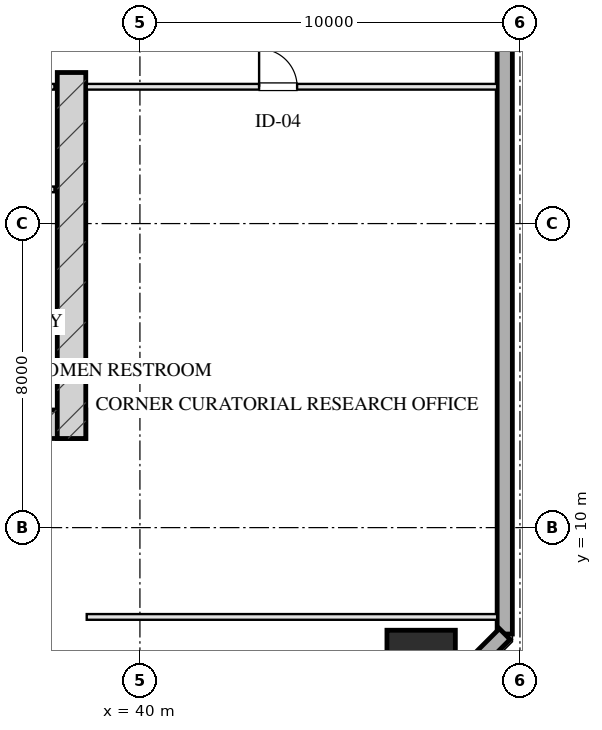
"""IFC4 building model, lengths in metres.
Left out: names, types, materials, properties, quantities, classifications, styles, units other than length and angle.
Written with IfcOpenShell. Run it as: python <this file> out.ifc"""

import sys

from ifc_helpers import new_model, si_unit, direction, frame, frame_2d, origin, origin_2d, place, context, subcontext, project, spatial, rectangle, hollow_rectangle, extrude, element, fill, save


model = new_model("IFC4")
c1 = context("Model", 3, precision=1e-05, world=origin(), true_north=direction((0.0, 1.0)))
c2 = subcontext(c1, "Body", "Model", "MODEL_VIEW")
j1 = project(units=[si_unit("LENGTHUNIT", "METRE"), si_unit("PLANEANGLEUNIT", "RADIAN")], contexts=[c1])
p1 = place(None, origin())
s1 = spatial("IfcSite", under=j1, at=p1, CompositionType="ELEMENT")
p2 = place(p1, origin())
s2 = spatial("IfcBuilding", under=s1, at=p2, CompositionType="ELEMENT")
p3 = place(p2, frame((0.0, 0.0, 38.0)))
s3 = spatial("IfcBuildingStorey", under=s2, at=p3, CompositionType="ELEMENT", Elevation=38.0)
p4 = place(p3, frame((21.425, 12.72, 0.0), z_axis=(0.0, 0.0, 1.0), x_axis=(1.0, 0.0, 0.0)))
e1 = element("IfcWall", 1, at=p4, inside=s3, PredefinedType="SHEAR", context=c2, shape_type="SweptSolid", body=[
    extrude(rectangle(XDim=17.15, YDim=0.75, at=frame_2d((8.575, 0.0))), origin(), (0.0, 0.0, 1.0), 4.0),
])
p5 = place(p3, frame((38.2, 21.975, 0.0), z_axis=(0.0, 0.0, 1.0), x_axis=(0.0, -1.0, 0.0)))
e2 = element("IfcWall", 2, at=p5, inside=s3, PredefinedType="SHEAR", context=c2, shape_type="SweptSolid", body=[
    extrude(rectangle(XDim=9.63, YDim=0.75, at=frame_2d((4.815, 0.0))), origin(), (0.0, 0.0, 1.0), 4.0),
])
p6 = place(p3, frame((47.4, 6.4, 0.0), z_axis=(0.0, 0.0, 1.0), x_axis=(1.0, 0.0, 0.0)))
e3 = element("IfcColumn", 3, at=p6, inside=s3, PredefinedType="COLUMN", context=c2, shape_type="SweptSolid", body=[
    extrude(hollow_rectangle(XDim=1.8, YDim=1.8, WallThickness=0.06, at=origin_2d()), origin(), (0.0, 0.0, 1.0), 4.001),
])
p7 = place(p3, frame((49.6, 60.8, 0.0), z_axis=(0.0, 0.0, 1.0), x_axis=(0.0, -1.0, 0.0)))
e4 = element("IfcWall", 4, at=p7, inside=s3, PredefinedType="SOLIDWALL", context=c2, shape_type="SweptSolid", body=[
    extrude(rectangle(XDim=53.6, YDim=0.4, at=frame_2d((26.8, 0.0))), origin(), (0.0, 0.0, 1.0), 3.16),
])
p8 = place(p7, frame((19.15, 0.0, 0.75)))
e5 = element("IfcOpeningElement", 5, at=p8, cuts=e4, PredefinedType="OPENING", context=c2, shape_type="SweptSolid", body=[
    extrude(rectangle(XDim=2.5, YDim=1.75, at=frame_2d((1.25, 0.875))), frame((0.0, 0.21, 0.0), z_axis=(0.0, -1.0, 0.0), x_axis=(1.0, 0.0, 0.0)), (0.0, 0.0, 1.0), 0.42),
])
p9 = place(p7, frame((32.05, 0.0, 0.0)))
e6 = element("IfcOpeningElement", 6, at=p9, cuts=e4, PredefinedType="OPENING", context=c2, shape_type="SweptSolid", body=[
    extrude(rectangle(XDim=1.1, YDim=2.15, at=frame_2d((0.55, 1.075))), frame((0.0, 0.21, 0.0), z_axis=(0.0, -1.0, 0.0), x_axis=(1.0, 0.0, 0.0)), (0.0, 0.0, 1.0), 0.42),
])
p10 = place(p3, frame((49.6, 7.2, 0.0), z_axis=(0.0, 0.0, 1.0), x_axis=(-0.707106781187, -0.707106781187, 0.0)))
e7 = element("IfcWall", 7, at=p10, inside=s3, PredefinedType="SOLIDWALL", context=c2, shape_type="SweptSolid", body=[
    extrude(rectangle(XDim=4.243, YDim=0.4, at=frame_2d((2.121, 0.0))), origin(), (0.0, 0.0, 1.0), 3.16),
])
p11 = place(p3, frame((33.95, 21.6, 0.0), z_axis=(0.0, 0.0, 1.0), x_axis=(1.0, 0.0, 0.0)))
e8 = element("IfcWall", 8, at=p11, inside=s3, PredefinedType="PARTITIONING", context=c2, shape_type="SweptSolid", body=[
    extrude(rectangle(XDim=3.8, YDim=0.15, at=frame_2d((1.9, 0.0))), origin(), (0.0, 0.0, 1.0), 3.725),
])
p12 = place(p11, frame((0.45, 0.0, 0.0)))
e9 = element("IfcOpeningElement", 9, at=p12, cuts=e8, PredefinedType="OPENING", context=c2, shape_type="SweptSolid", body=[
    extrude(rectangle(XDim=0.95, YDim=2.05, at=frame_2d((0.475, 1.025))), frame((0.0, 0.085, 0.0), z_axis=(0.0, -1.0, 0.0), x_axis=(1.0, 0.0, 0.0)), (0.0, 0.0, 1.0), 0.17),
])
p13 = place(p3, frame((33.95, 18.9, 0.0), z_axis=(0.0, 0.0, 1.0), x_axis=(1.0, 0.0, 0.0)))
e10 = element("IfcWall", 10, at=p13, inside=s3, PredefinedType="PARTITIONING", context=c2, shape_type="SweptSolid", body=[
    extrude(rectangle(XDim=3.8, YDim=0.15, at=frame_2d((1.9, 0.0))), origin(), (0.0, 0.0, 1.0), 3.725),
])
p14 = place(p13, frame((0.35, 0.0, 0.0)))
e11 = element("IfcOpeningElement", 11, at=p14, cuts=e10, PredefinedType="OPENING", context=c2, shape_type="SweptSolid", body=[
    extrude(rectangle(XDim=0.9, YDim=2.05, at=frame_2d((0.45, 1.025))), frame((0.0, 0.085, 0.0), z_axis=(0.0, -1.0, 0.0), x_axis=(1.0, 0.0, 0.0)), (0.0, 0.0, 1.0), 0.17),
])
p15 = place(p13, frame((2.1, 0.0, 0.0)))
e12 = element("IfcOpeningElement", 12, at=p15, cuts=e10, PredefinedType="OPENING", context=c2, shape_type="SweptSolid", body=[
    extrude(rectangle(XDim=0.9, YDim=2.05, at=frame_2d((0.45, 1.025))), frame((0.0, 0.085, 0.0), z_axis=(0.0, -1.0, 0.0), x_axis=(1.0, 0.0, 0.0)), (0.0, 0.0, 1.0), 0.17),
])
p16 = place(p3, frame((38.6, 7.65, 0.0), z_axis=(0.0, 0.0, 1.0), x_axis=(1.0, 0.0, 0.0)))
e13 = element("IfcWall", 13, at=p16, inside=s3, PredefinedType="PARTITIONING", context=c2, shape_type="SweptSolid", body=[
    extrude(rectangle(XDim=10.8, YDim=0.15, at=frame_2d((5.4, 0.0))), origin(), (0.0, 0.0, 1.0), 3.725),
])
p17 = place(p3, frame((38.6, 21.6, 0.0), z_axis=(0.0, 0.0, 1.0), x_axis=(1.0, 0.0, 0.0)))
e14 = element("IfcWall", 14, at=p17, inside=s3, PredefinedType="PARTITIONING", context=c2, shape_type="SweptSolid", body=[
    extrude(rectangle(XDim=10.8, YDim=0.15, at=frame_2d((5.4, 0.0))), origin(), (0.0, 0.0, 1.0), 3.725),
])
p18 = place(p17, frame((4.536, 0.0, 0.0)))
e15 = element("IfcOpeningElement", 15, at=p18, cuts=e14, PredefinedType="OPENING", context=c2, shape_type="SweptSolid", body=[
    extrude(rectangle(XDim=1.0, YDim=2.05, at=frame_2d((0.5, 1.025))), frame((0.0, 0.085, 0.0), z_axis=(0.0, -1.0, 0.0), x_axis=(1.0, 0.0, 0.0)), (0.0, 0.0, 1.0), 0.17),
])
p19 = place(p18, origin())
e16 = element("IfcDoor", 16, at=p19, inside=s3, OperationType="SINGLE_SWING_LEFT", PredefinedType="DOOR", context=c2, shape_type="SweptSolid", body=[
    extrude(rectangle(XDim=1.0, YDim=2.05, at=frame_2d((0.5, 1.025))), frame((0.0, 0.025, 0.0), z_axis=(0.0, -1.0, 0.0), x_axis=(1.0, 0.0, 0.0)), (0.0, 0.0, 1.0), 0.05),
])
fill(e15, e16)
save(model, sys.argv[1])
